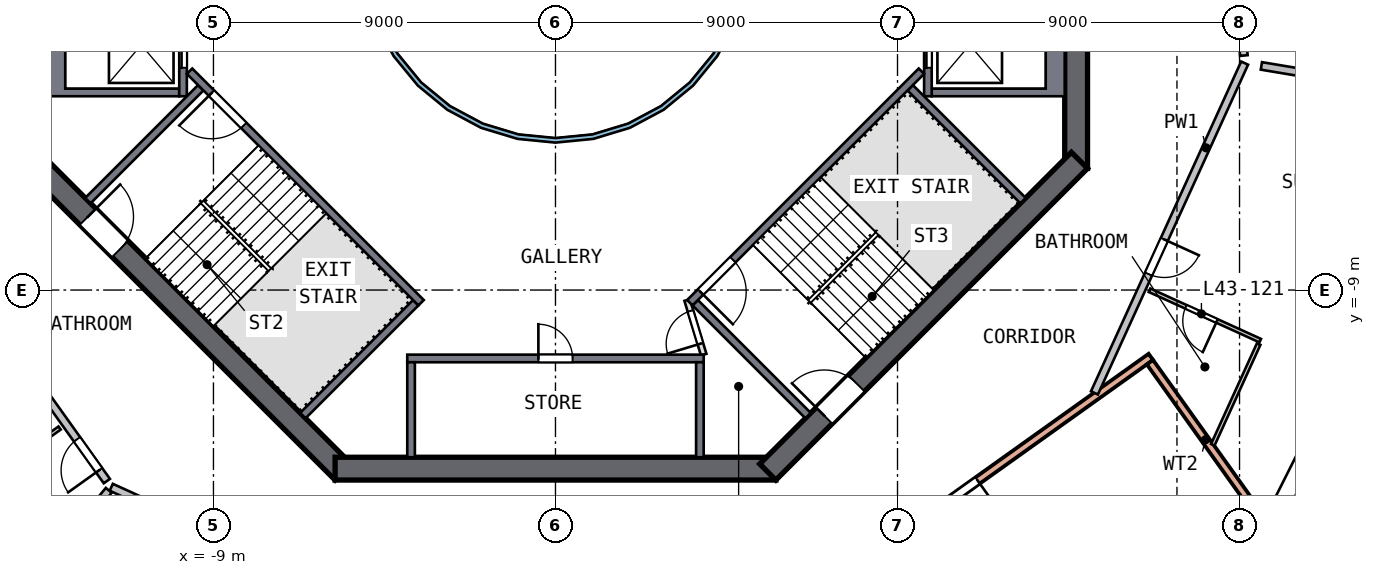
"""IFC4 building model, lengths in metres.
Left out: names, types, materials, properties, quantities, classifications, styles, units other than length and angle.
Written with IfcOpenShell. Run it as: python <this file> out.ifc"""

import sys

from ifc_helpers import new_model, si_unit, direction, frame, frame_2d, origin, place, context, subcontext, project, spatial, polyline, rectangle, outline, extrude, element, fill, save


model = new_model("IFC4")
c1 = context("Model", 3, precision=1e-05, world=origin(), true_north=direction((0.0, 1.0)))
c2 = subcontext(c1, "Body", "Model", "MODEL_VIEW")
j1 = project(units=[si_unit("LENGTHUNIT", "METRE"), si_unit("PLANEANGLEUNIT", "RADIAN")], contexts=[c1])
p1 = place(None, origin())
s1 = spatial("IfcSite", under=j1, at=p1, CompositionType="ELEMENT")
p2 = place(p1, origin())
s2 = spatial("IfcBuilding", under=s1, at=p2, CompositionType="ELEMENT")
p3 = place(p2, frame((0.0, 0.0, 180.0)))
s3 = spatial("IfcBuildingStorey", under=s2, at=p3, CompositionType="ELEMENT", Elevation=180.0)
p4 = place(p3, frame((13.7, -5.799, 0.0), z_axis=(0.0, 0.0, 1.0), x_axis=(0.0, 1.0, 0.0)))
e1 = element("IfcWall", 1, at=p4, inside=s3, PredefinedType="SHEAR", context=c2, shape_type="SweptSolid", body=[
    extrude(rectangle(XDim=11.598, YDim=0.6, at=frame_2d((5.799, 0.0))), origin(), (0.0, 0.0, 1.0), 3.5),
])
p5 = place(p4, frame((4.899, 0.0, 0.0)))
e2 = element("IfcOpeningElement", 2, at=p5, cuts=e1, PredefinedType="OPENING", context=c2, shape_type="SweptSolid", body=[
    extrude(rectangle(XDim=1.8, YDim=2.1, at=frame_2d((0.9, 1.05))), frame((0.0, 0.31, 0.0), z_axis=(0.0, -1.0, 0.0), x_axis=(1.0, 0.0, 0.0)), (0.0, 0.0, 1.0), 0.62),
])
p6 = place(p3, frame((-13.788, -5.587, 0.0), z_axis=(0.0, 0.0, 1.0), x_axis=(0.707106781, -0.707106781, 0.0)))
e3 = element("IfcWall", 3, at=p6, inside=s3, PredefinedType="SHEAR", context=c2, shape_type="SweptSolid", body=[
    extrude(rectangle(XDim=11.598, YDim=0.6, at=frame_2d((5.799, 0.0))), origin(), (0.0, 0.0, 1.0), 3.5),
])
p7 = place(p6, frame((2.099, 0.0, 0.0)))
e4 = element("IfcOpeningElement", 4, at=p7, cuts=e3, PredefinedType="OPENING", context=c2, shape_type="SweptSolid", body=[
    extrude(rectangle(XDim=1.2, YDim=2.1, at=frame_2d((0.6, 1.05))), frame((0.0, 0.31, 0.0), z_axis=(0.0, -1.0, 0.0), x_axis=(1.0, 0.0, 0.0)), (0.0, 0.0, 1.0), 0.62),
])
p8 = place(p3, frame((-5.799, -13.7, 0.0), z_axis=(0.0, 0.0, 1.0), x_axis=(1.0, 0.0, 0.0)))
e5 = element("IfcWall", 5, at=p8, inside=s3, PredefinedType="SHEAR", context=c2, shape_type="SweptSolid", body=[
    extrude(rectangle(XDim=11.598, YDim=0.6, at=frame_2d((5.799, 0.0))), origin(), (0.0, 0.0, 1.0), 3.5),
])
p9 = place(p3, frame((5.587, -13.788, 0.0), z_axis=(0.0, 0.0, 1.0), x_axis=(0.707106781, 0.707106781, 0.0)))
e6 = element("IfcWall", 6, at=p9, inside=s3, PredefinedType="SHEAR", context=c2, shape_type="SweptSolid", body=[
    extrude(rectangle(XDim=11.598, YDim=0.6, at=frame_2d((5.799, 0.0))), origin(), (0.0, 0.0, 1.0), 3.5),
])
p10 = place(p9, frame((2.099, 0.0, 0.0)))
e7 = element("IfcOpeningElement", 7, at=p10, cuts=e6, PredefinedType="OPENING", context=c2, shape_type="SweptSolid", body=[
    extrude(rectangle(XDim=1.2, YDim=2.1, at=frame_2d((0.6, 1.05))), frame((0.0, 0.31, 0.0), z_axis=(0.0, -1.0, 0.0), x_axis=(1.0, 0.0, 0.0)), (0.0, 0.0, 1.0), 0.62),
])
p11 = place(p3, frame((15.666, -10.759, 0.0), z_axis=(0.0, 0.0, 1.0), x_axis=(-0.813914889, -0.580984125, 0.0)))
e8 = element("IfcWall", 8, at=p11, inside=s3, PredefinedType="SOLIDWALL", context=c2, shape_type="SweptSolid", body=[
    extrude(rectangle(XDim=13.0, YDim=0.2, at=frame_2d((6.5, 0.0))), origin(), (0.0, 0.0, 1.0), 3.19),
])
p12 = place(p11, frame((5.6, 0.0, 0.0)))
e9 = element("IfcOpeningElement", 9, at=p12, cuts=e8, PredefinedType="OPENING", context=c2, shape_type="SweptSolid", body=[
    extrude(rectangle(XDim=1.8, YDim=2.4, at=frame_2d((0.9, 1.2))), frame((0.0, 0.11, 0.0), z_axis=(0.0, -1.0, 0.0), x_axis=(1.0, 0.0, 0.0)), (0.0, 0.0, 1.0), 0.22),
])
p13 = place(p3, frame((18.559, -14.984, 0.0), z_axis=(0.0, 0.0, 1.0), x_axis=(-0.580994335, 0.813907601, 0.0)))
e10 = element("IfcWall", 10, at=p13, inside=s3, PredefinedType="SOLIDWALL", context=c2, shape_type="SweptSolid", body=[
    extrude(rectangle(XDim=5.02, YDim=0.2, at=frame_2d((2.51, 0.0))), origin(), (0.0, 0.0, 1.0), 3.19),
])
p14 = place(p3, origin())
e11 = element("IfcWall", 11, at=p14, inside=s3, PredefinedType="SOLIDWALL", context=c2, shape_type="SweptSolid", body=[
    extrude(outline(polyline([(13.4, -3.9), (9.9, -3.9), (9.9, -3.7), (12.9, -3.7), (12.9, -1.4), (9.9, -1.4), (9.9, -1.2), (13.4, -1.2), (13.4, -3.9)])), origin(), (0.0, 0.0, 1.0), 3.19),
])
p15 = place(p3, frame((9.8, -1.2, 0.0), z_axis=(0.0, 0.0, 1.0), x_axis=(0.0, -1.0, 0.0)))
e12 = element("IfcWall", 12, at=p15, inside=s3, PredefinedType="SOLIDWALL", context=c2, shape_type="SweptSolid", body=[
    extrude(rectangle(XDim=2.7, YDim=0.2, at=frame_2d((1.35, 0.0))), origin(), (0.0, 0.0, 1.0), 3.19),
])
p16 = place(p15, frame((0.75, 0.0, 0.0)))
e13 = element("IfcOpeningElement", 13, at=p16, cuts=e12, PredefinedType="OPENING", context=c2, shape_type="SweptSolid", body=[
    extrude(rectangle(XDim=1.2, YDim=2.1, at=frame_2d((0.6, 1.05))), frame((0.0, 0.11, 0.0), z_axis=(0.0, -1.0, 0.0), x_axis=(1.0, 0.0, 0.0)), (0.0, 0.0, 1.0), 0.22),
])
p17 = place(p3, origin())
e14 = element("IfcWall", 14, at=p17, inside=s3, PredefinedType="SOLIDWALL", context=c2, shape_type="SweptSolid", body=[
    extrude(outline(polyline([(-13.4, -3.9), (-13.4, -1.2), (-9.9, -1.2), (-9.9, -1.4), (-12.9, -1.4), (-12.9, -3.7), (-9.9, -3.7), (-9.9, -3.9), (-13.4, -3.9)])), origin(), (0.0, 0.0, 1.0), 3.19),
])
p18 = place(p3, frame((-9.8, -1.2, 0.0), z_axis=(0.0, 0.0, 1.0), x_axis=(0.0, -1.0, 0.0)))
e15 = element("IfcWall", 15, at=p18, inside=s3, PredefinedType="SOLIDWALL", context=c2, shape_type="SweptSolid", body=[
    extrude(rectangle(XDim=2.7, YDim=0.2, at=frame_2d((1.35, 0.0))), origin(), (0.0, 0.0, 1.0), 3.19),
])
p19 = place(p18, frame((0.75, 0.0, 0.0)))
e16 = element("IfcOpeningElement", 16, at=p19, cuts=e15, PredefinedType="OPENING", context=c2, shape_type="SweptSolid", body=[
    extrude(rectangle(XDim=1.2, YDim=2.1, at=frame_2d((0.6, 1.05))), frame((0.0, 0.11, 0.0), z_axis=(0.0, -1.0, 0.0), x_axis=(1.0, 0.0, 0.0)), (0.0, 0.0, 1.0), 0.22),
])
p20 = place(p3, frame((-3.9, -10.8, 0.0), z_axis=(0.0, 0.0, 1.0), x_axis=(1.0, 0.0, 0.0)))
e17 = element("IfcWall", 17, at=p20, inside=s3, PredefinedType="SOLIDWALL", context=c2, shape_type="SweptSolid", body=[
    extrude(rectangle(XDim=7.8, YDim=0.2, at=frame_2d((3.9, 0.0))), origin(), (0.0, 0.0, 1.0), 3.19),
])
p21 = place(p20, frame((3.45, 0.0, 0.0)))
e18 = element("IfcOpeningElement", 18, at=p21, cuts=e17, PredefinedType="OPENING", context=c2, shape_type="SweptSolid", body=[
    extrude(rectangle(XDim=0.9, YDim=2.1, at=frame_2d((0.45, 1.05))), frame((0.0, 0.11, 0.0), z_axis=(0.0, -1.0, 0.0), x_axis=(1.0, 0.0, 0.0)), (0.0, 0.0, 1.0), 0.22),
])
for number, where, z_axis, x_axis in (
    (19, (-3.8, -10.9, 0.0), (0.0, 0.0, 1.0), (0.0, -1.0, 0.0)),
    (20, (3.8, -10.9, 0.0), (0.0, 0.0, 1.0), (0.0, -1.0, 0.0)),
):
    element("IfcWall", number, at=place(p3, frame(where, z_axis=z_axis, x_axis=x_axis)), inside=s3, PredefinedType="SOLIDWALL", context=c2, shape_type="SweptSolid", body=[
        extrude(rectangle(XDim=2.5, YDim=0.2, at=frame_2d((1.25, 0.0))), origin(), (0.0, 0.0, 1.0), 3.19),
    ])
p22 = place(p3, frame((-3.535, -9.334, 0.0), z_axis=(0.0, 0.0, 1.0), x_axis=(-0.707120946, 0.707092617, 0.0)))
e21 = element("IfcWall", 21, at=p22, inside=s3, PredefinedType="SOLIDWALL", context=c2, shape_type="SweptSolid", body=[
    extrude(rectangle(XDim=8.618, YDim=0.2, at=frame_2d((4.309, 0.0))), origin(), (0.0, 0.0, 1.0), 3.19),
])
p23 = place(p22, frame((6.6, 0.0, 0.0)))
e22 = element("IfcOpeningElement", 22, at=p23, cuts=e21, PredefinedType="OPENING", context=c2, shape_type="SweptSolid", body=[
    extrude(rectangle(XDim=1.2, YDim=2.1, at=frame_2d((0.6, 1.05))), frame((0.0, 0.11, 0.0), z_axis=(0.0, -1.0, 0.0), x_axis=(1.0, 0.0, 0.0)), (0.0, 0.0, 1.0), 0.22),
])
for number, where, z_axis, x_axis in (
    (23, (-9.334, -3.677, 0.0), (0.0, 0.0, 1.0), (-0.707, -0.707, 0.0)),
    (24, (-3.677, -9.334, 0.0), (0.0, 0.0, 1.0), (-0.707, -0.707, 0.0)),
):
    element("IfcWall", number, at=place(p3, frame(where, z_axis=z_axis, x_axis=x_axis)), inside=s3, PredefinedType="SOLIDWALL", context=c2, shape_type="SweptSolid", body=[
        extrude(rectangle(XDim=4.2, YDim=0.2, at=frame_2d((2.1, 0.0))), origin(), (0.0, 0.0, 1.0), 3.19),
    ])
p24 = place(p3, frame((9.629, -3.24, 0.0), z_axis=(0.0, 0.0, 1.0), x_axis=(-0.707120946, -0.707092617, 0.0)))
e25 = element("IfcWall", 25, at=p24, inside=s3, PredefinedType="SOLIDWALL", context=c2, shape_type="SweptSolid", body=[
    extrude(rectangle(XDim=8.618, YDim=0.2, at=frame_2d((4.309, 0.0))), origin(), (0.0, 0.0, 1.0), 3.19),
])
p25 = place(p24, frame((7.018, 0.0, 0.0)))
e26 = element("IfcOpeningElement", 26, at=p25, cuts=e25, PredefinedType="OPENING", context=c2, shape_type="SweptSolid", body=[
    extrude(rectangle(XDim=1.2, YDim=2.1, at=frame_2d((0.6, 1.05))), frame((0.0, 0.11, 0.0), z_axis=(0.0, -1.0, 0.0), x_axis=(1.0, 0.0, 0.0)), (0.0, 0.0, 1.0), 0.22),
])
for number, where, z_axis, x_axis in (
    (27, (3.677, -9.334, 0.0), (0.0, 0.0, 1.0), (0.707, -0.707, 0.0)),
    (28, (9.334, -3.677, 0.0), (0.0, 0.0, 1.0), (0.707, -0.707, 0.0)),
):
    element("IfcWall", number, at=place(p3, frame(where, z_axis=z_axis, x_axis=x_axis)), inside=s3, PredefinedType="SOLIDWALL", context=c2, shape_type="SweptSolid", body=[
        extrude(rectangle(XDim=4.2, YDim=0.2, at=frame_2d((2.1, 0.0))), origin(), (0.0, 0.0, 1.0), 3.19),
    ])
p26 = place(p3, frame((3.9, -10.7, 0.0), z_axis=(0.0, 0.0, 1.0), x_axis=(-0.289808785, 0.957084567, 0.0)))
e29 = element("IfcWall", 29, at=p26, inside=s3, PredefinedType="PARTITIONING", context=c2, shape_type="SweptSolid", body=[
    extrude(rectangle(XDim=1.501, YDim=0.15, at=frame_2d((0.75, 0.0))), origin(), (0.0, 0.0, 1.0), 3.19),
])
p27 = place(p26, frame((0.301, 0.0, 0.0)))
e30 = element("IfcOpeningElement", 30, at=p27, cuts=e29, PredefinedType="OPENING", context=c2, shape_type="SweptSolid", body=[
    extrude(rectangle(XDim=0.9, YDim=2.1, at=frame_2d((0.45, 1.05))), frame((0.0, 0.085, 0.0), z_axis=(0.0, -1.0, 0.0), x_axis=(1.0, 0.0, 0.0)), (0.0, 0.0, 1.0), 0.17),
])
p28 = place(p3, origin())
e31 = element("IfcWall", 31, at=p28, inside=s3, PredefinedType="SOLIDWALL", context=c2, shape_type="SweptSolid", body=[
    extrude(outline(polyline([(5.021, -0.999), (4.73, -1.959), (4.257, -2.844), (3.62, -3.62), (2.844, -4.257), (1.959, -4.73), (0.999, -5.021), (0.0, -5.12), (-0.999, -5.021), (-1.959, -4.73), (-2.844, -4.257), (-3.62, -3.62), (-4.257, -2.844), (-4.73, -1.959), (-5.021, -0.999), (-5.12, 0.0), (-5.021, 0.999), (-4.73, 1.959), (-4.257, 2.844), (-3.62, 3.62), (-2.844, 4.257), (-1.959, 4.73), (-0.999, 5.021), (0.0, 5.12), (0.999, 5.021), (1.959, 4.73), (2.844, 4.257), (3.62, 3.62), (4.257, 2.844), (4.73, 1.959), (5.021, 0.999), (5.12, 0.0), (5.021, -0.999)]), holes=[polyline([(4.904, 0.976), (4.619, 1.913), (4.157, 2.778), (3.535, 3.535), (2.778, 4.157), (1.913, 4.619), (0.976, 4.904), (0.0, 5.0), (-0.976, 4.904), (-1.913, 4.619), (-2.778, 4.157), (-3.535, 3.535), (-4.157, 2.778), (-4.619, 1.913), (-4.904, 0.976), (-5.0, 0.0), (-4.904, -0.976), (-4.619, -1.913), (-4.157, -2.778), (-3.535, -3.535), (-2.778, -4.157), (-1.913, -4.619), (-0.976, -4.904), (0.0, -5.0), (0.976, -4.904), (1.913, -4.619), (2.778, -4.157), (3.535, -3.535), (4.157, -2.778), (4.619, -1.913), (4.904, -0.976), (5.0, 0.0), (4.904, 0.976)])]), origin(), (0.0, 0.0, 1.0), 3.19),
])
p29 = place(p3, frame((-11.805, -14.027, 0.0), z_axis=(0.0, 0.0, 1.0), x_axis=(-0.580997508, 0.813905336, 0.0)))
e32 = element("IfcWall", 32, at=p29, inside=s3, PredefinedType="SOLIDWALL", context=c2, shape_type="SweptSolid", body=[
    extrude(rectangle(XDim=9.116, YDim=0.2, at=frame_2d((4.558, 0.0))), origin(), (0.0, 0.0, 1.0), 3.19),
])
p30 = place(p29, frame((0.35, 0.0, 0.0)))
e33 = element("IfcOpeningElement", 33, at=p30, cuts=e32, PredefinedType="OPENING", context=c2, shape_type="SweptSolid", body=[
    extrude(rectangle(XDim=1.0, YDim=2.1, at=frame_2d((0.5, 1.05))), frame((0.0, 0.11, 0.0), z_axis=(0.0, -1.0, 0.0), x_axis=(1.0, 0.0, 0.0)), (0.0, 0.0, 1.0), 0.22),
])
p31 = place(p3, frame((-3.028, -18.134, 0.0), z_axis=(0.0, 0.0, 1.0), x_axis=(-0.910100085, 0.414388507, 0.0)))
e34 = element("IfcWall", 34, at=p31, inside=s3, PredefinedType="SOLIDWALL", context=c2, shape_type="SweptSolid", body=[
    extrude(rectangle(XDim=9.517, YDim=0.2, at=frame_2d((4.758, 0.0))), origin(), (0.0, 0.0, 1.0), 3.19),
])
p32 = place(p31, frame((3.869, 0.0, 0.0)))
e35 = element("IfcOpeningElement", 35, at=p32, cuts=e34, PredefinedType="OPENING", context=c2, shape_type="SweptSolid", body=[
    extrude(rectangle(XDim=1.8, YDim=2.1, at=frame_2d((0.9, 1.05))), frame((0.0, 0.11, 0.0), z_axis=(0.0, -1.0, 0.0), x_axis=(1.0, 0.0, 0.0)), (0.0, 0.0, 1.0), 0.22),
])
p33 = place(p3, frame((18.134, -3.028, 0.0), z_axis=(0.0, 0.0, 1.0), x_axis=(-0.414385345, -0.910101525, 0.0)))
e36 = element("IfcWall", 36, at=p33, inside=s3, PredefinedType="SOLIDWALL", context=c2, shape_type="SweptSolid", body=[
    extrude(rectangle(XDim=9.537, YDim=0.2, at=frame_2d((4.769, 0.0))), origin(), (0.0, 0.0, 1.0), 3.19),
])
p34 = place(p33, frame((5.1, 0.0, 0.0)))
e37 = element("IfcOpeningElement", 37, at=p34, cuts=e36, PredefinedType="OPENING", context=c2, shape_type="SweptSolid", body=[
    extrude(rectangle(XDim=1.0, YDim=2.1, at=frame_2d((0.5, 1.05))), frame((0.0, 0.11, 0.0), z_axis=(0.0, -1.0, 0.0), x_axis=(1.0, 0.0, 0.0)), (0.0, 0.0, 1.0), 0.22),
])
p35 = place(p3, frame((17.218, 6.445, 0.0), z_axis=(0.0, 0.0, 1.0), x_axis=(0.096195227, -0.995362486, 0.0)))
e38 = element("IfcWall", 38, at=p35, inside=s3, PredefinedType="SOLIDWALL", context=c2, shape_type="SweptSolid", body=[
    extrude(rectangle(XDim=9.317, YDim=0.2, at=frame_2d((4.658, 0.0))), origin(), (0.0, 0.0, 1.0), 3.19),
])
p36 = place(p35, frame((3.869, 0.0, 0.0)))
e39 = element("IfcOpeningElement", 39, at=p36, cuts=e38, PredefinedType="OPENING", context=c2, shape_type="SweptSolid", body=[
    extrude(rectangle(XDim=1.8, YDim=2.1, at=frame_2d((0.9, 1.05))), frame((0.0, 0.11, 0.0), z_axis=(0.0, -1.0, 0.0), x_axis=(1.0, 0.0, 0.0)), (0.0, 0.0, 1.0), 0.22),
])
p37 = place(p3, frame((-15.872, -19.268, 0.0), z_axis=(0.0, 0.0, 1.0), x_axis=(0.635816927, 0.771839902, 0.0)))
e40 = element("IfcWall", 40, at=p37, inside=s3, PredefinedType="SOLIDWALL", context=c2, shape_type="SweptSolid", body=[
    extrude(rectangle(XDim=6.476, YDim=0.2, at=frame_2d((3.238, 0.0))), origin(), (0.0, 0.0, 1.0), 3.19),
])
p38 = place(p3, frame((24.623, -4.112, 0.0), z_axis=(0.0, 0.0, 1.0), x_axis=(-0.986342225, 0.16470888, 0.0)))
e41 = element("IfcWall", 41, at=p38, inside=s3, PredefinedType="SOLIDWALL", context=c2, shape_type="SweptSolid", body=[
    extrude(rectangle(XDim=6.132, YDim=0.2, at=frame_2d((3.066, 0.0))), origin(), (0.0, 0.0, 1.0), 3.19),
])
p39 = place(p3, frame((-15.49, -14.374, 0.0), z_axis=(0.0, 0.0, 1.0), x_axis=(0.813909397, 0.580991819, 0.0)))
e42 = element("IfcWall", 42, at=p39, inside=s3, PredefinedType="PARTITIONING", context=c2, shape_type="SweptSolid", body=[
    extrude(rectangle(XDim=3.0, YDim=0.1, at=frame_2d((1.5, 0.0))), origin(), (0.0, 0.0, 1.0), 3.19),
])
p40 = place(p39, frame((1.15, 0.0, 0.0)))
e43 = element("IfcOpeningElement", 43, at=p40, cuts=e42, PredefinedType="OPENING", context=c2, shape_type="SweptSolid", body=[
    extrude(rectangle(XDim=0.9, YDim=2.1, at=frame_2d((0.45, 1.05))), frame((0.0, 0.06, 0.0), z_axis=(0.0, -1.0, 0.0), x_axis=(1.0, 0.0, 0.0)), (0.0, 0.0, 1.0), 0.12),
])
p41 = place(p3, frame((18.544, -10.331, 0.0), z_axis=(0.0, 0.0, 1.0), x_axis=(-0.910115479, 0.414354696, 0.0)))
e44 = element("IfcWall", 44, at=p41, inside=s3, PredefinedType="PARTITIONING", context=c2, shape_type="SweptSolid", body=[
    extrude(rectangle(XDim=3.2, YDim=0.1, at=frame_2d((1.6, 0.0))), origin(), (0.0, 0.0, 1.0), 3.19),
])
p42 = place(p41, frame((1.25, 0.0, 0.0)))
e45 = element("IfcOpeningElement", 45, at=p42, cuts=e44, PredefinedType="OPENING", context=c2, shape_type="SweptSolid", body=[
    extrude(rectangle(XDim=0.9, YDim=2.1, at=frame_2d((0.45, 1.05))), frame((0.0, 0.06, 0.0), z_axis=(0.0, -1.0, 0.0), x_axis=(1.0, 0.0, 0.0)), (0.0, 0.0, 1.0), 0.12),
])
p43 = place(p3, frame((18.503, -10.422, 0.0), z_axis=(0.0, 0.0, 1.0), x_axis=(-0.414421888, -0.910084886, 0.0)))
e46 = element("IfcWall", 46, at=p43, inside=s3, PredefinedType="PARTITIONING", context=c2, shape_type="SweptSolid", body=[
    extrude(rectangle(XDim=2.912, YDim=0.1, at=frame_2d((1.456, 0.0))), origin(), (0.0, 0.0, 1.0), 3.19),
])
p44 = place(p12, origin())
e47 = element("IfcDoor", 47, at=p44, inside=s3, OperationType="DOUBLE_DOOR_SINGLE_SWING", PredefinedType="DOOR", context=c2, shape_type="SweptSolid", body=[
    extrude(rectangle(XDim=1.8, YDim=2.4, at=frame_2d((0.9, 1.2))), frame((0.0, 0.025, 0.0), z_axis=(0.0, -1.0, 0.0), x_axis=(1.0, 0.0, 0.0)), (0.0, 0.0, 1.0), 0.05),
])
fill(e9, e47)
p45 = place(p21, origin())
e48 = element("IfcDoor", 48, at=p45, inside=s3, OperationType="SINGLE_SWING_LEFT", PredefinedType="DOOR", context=c2, shape_type="SweptSolid", body=[
    extrude(rectangle(XDim=0.9, YDim=2.1, at=frame_2d((0.45, 1.05))), frame((0.0, 0.025, 0.0), z_axis=(0.0, -1.0, 0.0), x_axis=(1.0, 0.0, 0.0)), (0.0, 0.0, 1.0), 0.05),
])
fill(e18, e48)
p46 = place(p16, origin())
e49 = element("IfcDoor", 49, at=p46, inside=s3, OperationType="DOUBLE_DOOR_SLIDING", PredefinedType="DOOR", context=c2, shape_type="SweptSolid", body=[
    extrude(rectangle(XDim=1.2, YDim=2.1, at=frame_2d((0.6, 1.05))), frame((0.0, 0.025, 0.0), z_axis=(0.0, -1.0, 0.0), x_axis=(1.0, 0.0, 0.0)), (0.0, 0.0, 1.0), 0.05),
])
fill(e13, e49)
p47 = place(p19, origin())
e50 = element("IfcDoor", 50, at=p47, inside=s3, OperationType="DOUBLE_DOOR_SLIDING", PredefinedType="DOOR", context=c2, shape_type="SweptSolid", body=[
    extrude(rectangle(XDim=1.2, YDim=2.1, at=frame_2d((0.6, 1.05))), frame((0.0, 0.025, 0.0), z_axis=(0.0, -1.0, 0.0), x_axis=(1.0, 0.0, 0.0)), (0.0, 0.0, 1.0), 0.05),
])
fill(e16, e50)
p48 = place(p23, origin())
e51 = element("IfcDoor", 51, at=p48, inside=s3, OperationType="SINGLE_SWING_RIGHT", PredefinedType="DOOR", context=c2, shape_type="SweptSolid", body=[
    extrude(rectangle(XDim=1.2, YDim=2.1, at=frame_2d((0.6, 1.05))), frame((0.0, 0.025, 0.0), z_axis=(0.0, -1.0, 0.0), x_axis=(1.0, 0.0, 0.0)), (0.0, 0.0, 1.0), 0.05),
])
fill(e22, e51)
p49 = place(p25, origin())
e52 = element("IfcDoor", 52, at=p49, inside=s3, OperationType="SINGLE_SWING_RIGHT", PredefinedType="DOOR", context=c2, shape_type="SweptSolid", body=[
    extrude(rectangle(XDim=1.2, YDim=2.1, at=frame_2d((0.6, 1.05))), frame((0.0, 0.025, 0.0), z_axis=(0.0, -1.0, 0.0), x_axis=(1.0, 0.0, 0.0)), (0.0, 0.0, 1.0), 0.05),
])
fill(e26, e52)
p50 = place(p7, origin())
e53 = element("IfcDoor", 53, at=p50, inside=s3, OperationType="SINGLE_SWING_LEFT", PredefinedType="DOOR", context=c2, shape_type="SweptSolid", body=[
    extrude(rectangle(XDim=1.2, YDim=2.1, at=frame_2d((0.6, 1.05))), frame((0.0, 0.025, 0.0), z_axis=(0.0, -1.0, 0.0), x_axis=(1.0, 0.0, 0.0)), (0.0, 0.0, 1.0), 0.05),
])
fill(e4, e53)
p51 = place(p10, origin())
e54 = element("IfcDoor", 54, at=p51, inside=s3, OperationType="SINGLE_SWING_LEFT", PredefinedType="DOOR", context=c2, shape_type="SweptSolid", body=[
    extrude(rectangle(XDim=1.2, YDim=2.1, at=frame_2d((0.6, 1.05))), frame((0.0, 0.025, 0.0), z_axis=(0.0, -1.0, 0.0), x_axis=(1.0, 0.0, 0.0)), (0.0, 0.0, 1.0), 0.05),
])
fill(e7, e54)
p52 = place(p27, origin())
e55 = element("IfcDoor", 55, at=p52, inside=s3, OperationType="SINGLE_SWING_LEFT", PredefinedType="DOOR", context=c2, shape_type="SweptSolid", body=[
    extrude(rectangle(XDim=0.9, YDim=2.1, at=frame_2d((0.45, 1.05))), frame((0.0, 0.025, 0.0), z_axis=(0.0, -1.0, 0.0), x_axis=(1.0, 0.0, 0.0)), (0.0, 0.0, 1.0), 0.05),
])
fill(e30, e55)
p53 = place(p30, origin())
e56 = element("IfcDoor", 56, at=p53, inside=s3, OperationType="SINGLE_SWING_LEFT", PredefinedType="DOOR", context=c2, shape_type="SweptSolid", body=[
    extrude(rectangle(XDim=1.0, YDim=2.1, at=frame_2d((0.5, 1.05))), frame((0.0, 0.025, 0.0), z_axis=(0.0, -1.0, 0.0), x_axis=(1.0, 0.0, 0.0)), (0.0, 0.0, 1.0), 0.05),
])
fill(e33, e56)
p54 = place(p34, origin())
e57 = element("IfcDoor", 57, at=p54, inside=s3, OperationType="SINGLE_SWING_LEFT", PredefinedType="DOOR", context=c2, shape_type="SweptSolid", body=[
    extrude(rectangle(XDim=1.0, YDim=2.1, at=frame_2d((0.5, 1.05))), frame((0.0, 0.025, 0.0), z_axis=(0.0, -1.0, 0.0), x_axis=(1.0, 0.0, 0.0)), (0.0, 0.0, 1.0), 0.05),
])
fill(e37, e57)
p55 = place(p42, origin())
e58 = element("IfcDoor", 58, at=p55, inside=s3, OperationType="SINGLE_SWING_LEFT", PredefinedType="DOOR", context=c2, shape_type="SweptSolid", body=[
    extrude(rectangle(XDim=0.9, YDim=2.1, at=frame_2d((0.45, 1.05))), frame((0.0, 0.025, 0.0), z_axis=(0.0, -1.0, 0.0), x_axis=(1.0, 0.0, 0.0)), (0.0, 0.0, 1.0), 0.05),
])
fill(e45, e58)
save(model, sys.argv[1])
